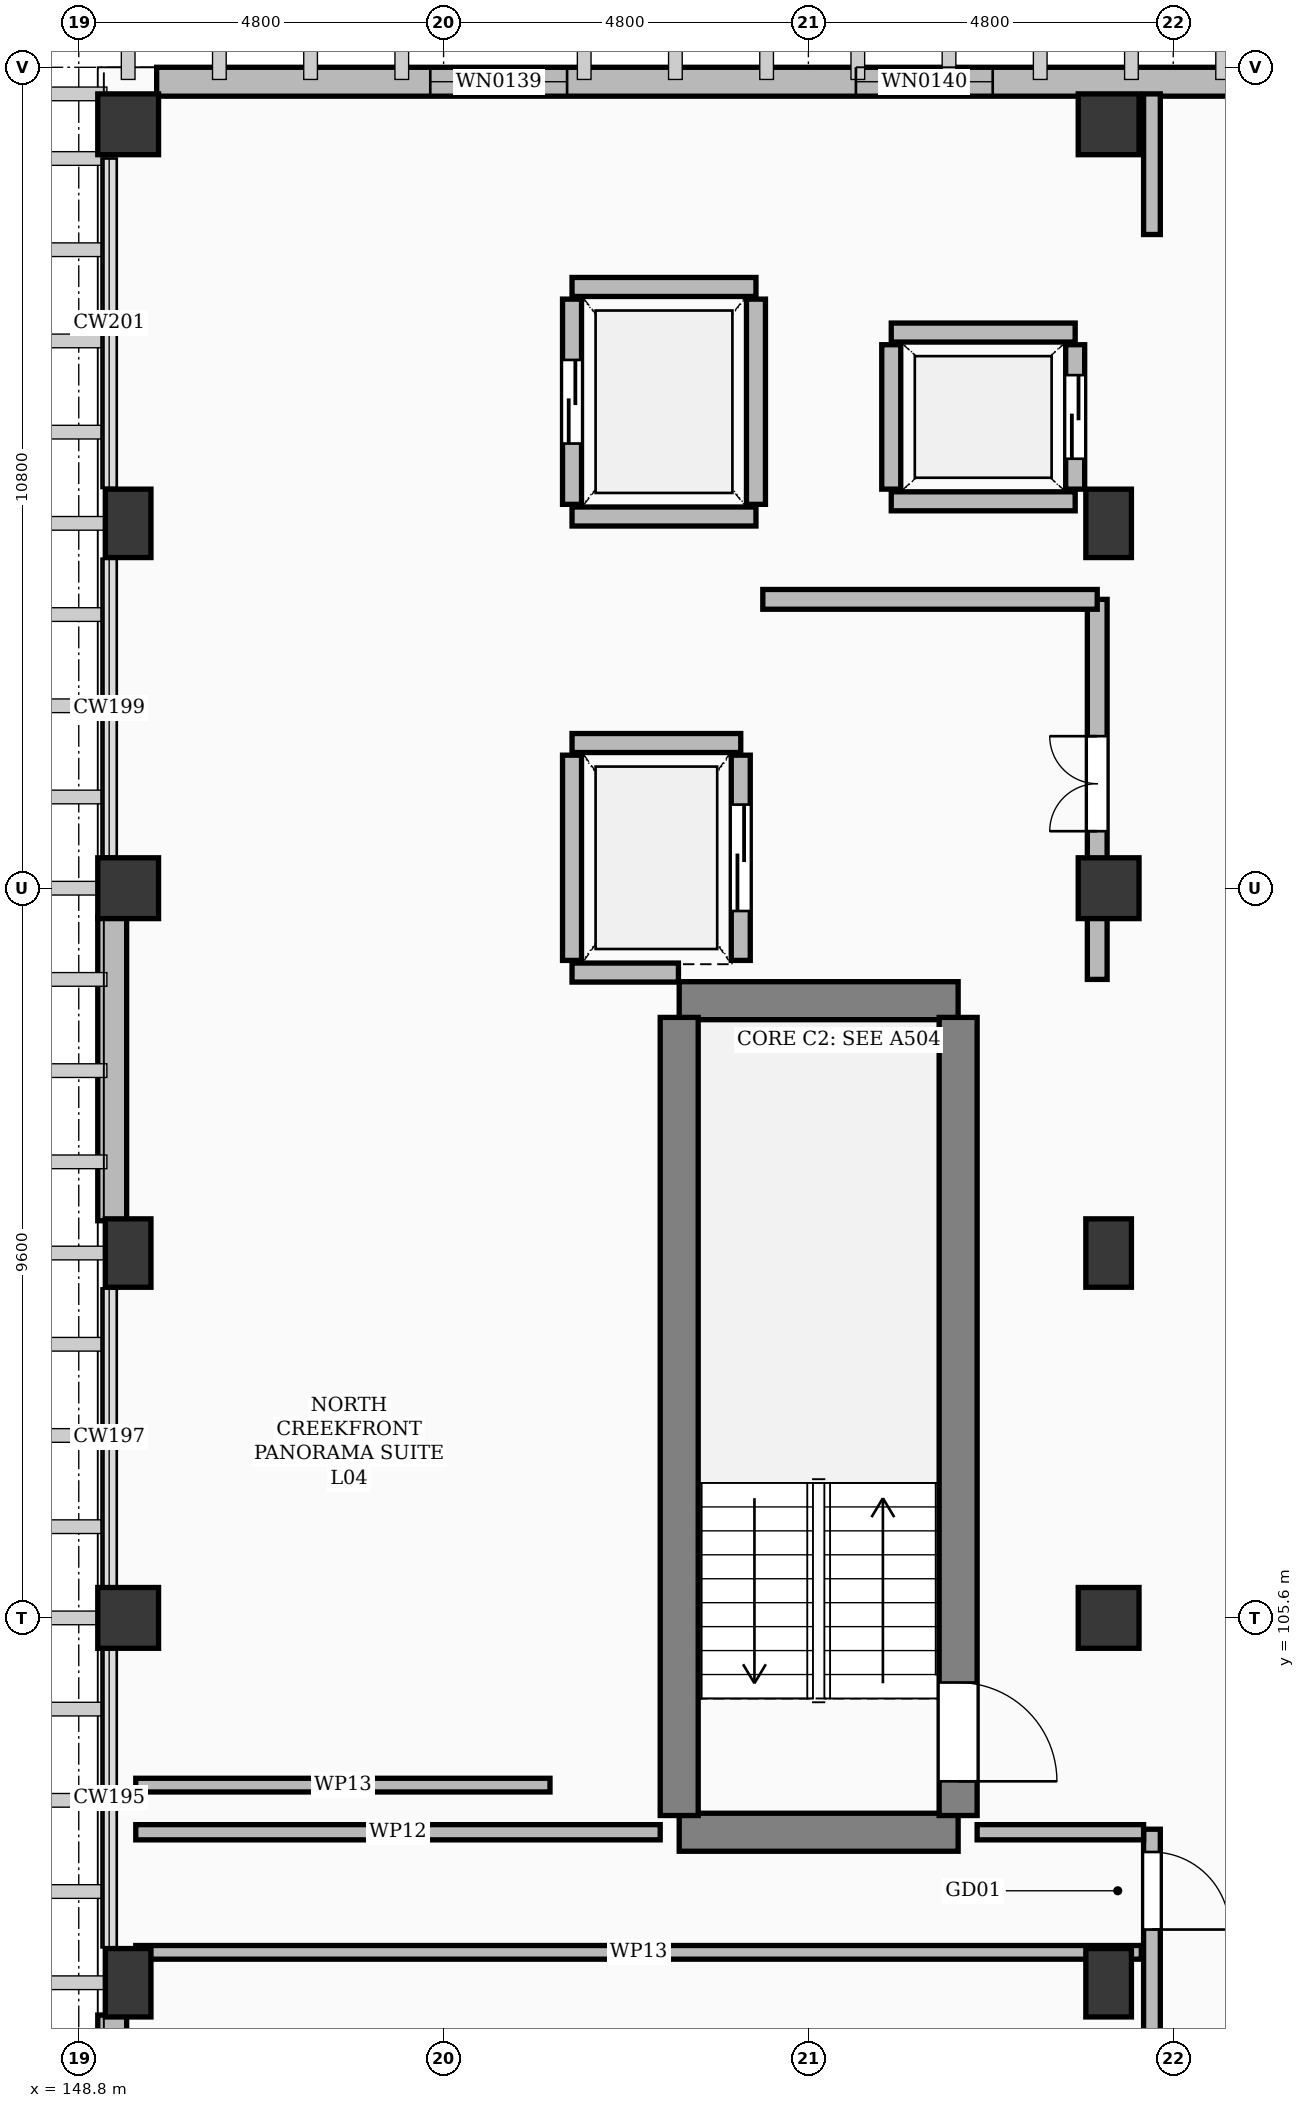
"""IFC4 building model, lengths in metres.
Left out: names, types, materials, properties, quantities, classifications, styles, units other than length and angle.
Written with IfcOpenShell. Run it as: python <this file> out.ifc"""

import sys

from ifc_helpers import new_model, si_unit, direction, frame, frame_2d, origin, origin_2d, place, context, subcontext, project, spatial, rectangle, extrude, element, fill, save


model = new_model("IFC4")
c1 = context("Model", 3, precision=1e-05, world=origin(), true_north=direction((0.0, 1.0)))
c2 = subcontext(c1, "Body", "Model", "MODEL_VIEW")
j1 = project(units=[si_unit("LENGTHUNIT", "METRE"), si_unit("PLANEANGLEUNIT", "RADIAN")], contexts=[c1])
p1 = place(None, origin())
s1 = spatial("IfcSite", under=j1, at=p1, CompositionType="ELEMENT")
p2 = place(p1, origin())
s2 = spatial("IfcBuilding", under=s1, at=p2, CompositionType="ELEMENT")
p3 = place(p2, frame((0.0, 0.0, 21.0)))
s3 = spatial("IfcBuildingStorey", under=s2, at=p3, CompositionType="ELEMENT", Elevation=21.0)
for number, where, z_axis, x_axis in (
    (1, (149.45, 105.6, 0.0), (0.0, 0.0, 1.0), (1.0, 0.0, 0.0)),
    (2, (149.45, 115.2, 0.0), (0.0, 0.0, 1.0), (1.0, 0.0, 0.0)),
    (3, (149.45, 125.25, 0.0), (0.0, 0.0, 1.0), (1.0, 0.0, 0.0)),
    (4, (162.35, 105.6, 0.0), (0.0, 0.0, 1.0), (1.0, 0.0, 0.0)),
    (5, (162.35, 115.2, 0.0), (0.0, 0.0, 1.0), (1.0, 0.0, 0.0)),
    (6, (162.35, 125.25, 0.0), (0.0, 0.0, 1.0), (1.0, 0.0, 0.0)),
):
    element("IfcColumn", number, at=place(p3, frame(where, z_axis=z_axis, x_axis=x_axis)), inside=s3, PredefinedType="COLUMN", context=c2, shape_type="SweptSolid", body=[
        extrude(rectangle(XDim=0.8, YDim=0.8, at=origin_2d()), origin(), (0.0, 0.0, 1.0), 3.6),
    ])
for number, where, z_axis, x_axis in (
    (7, (149.45, 100.8, -0.26), (0.0, 0.0, 1.0), (1.0, 0.0, 0.0)),
    (8, (149.45, 110.4, -0.26), (0.0, 0.0, 1.0), (1.0, 0.0, 0.0)),
    (9, (149.45, 120.0, -0.26), (0.0, 0.0, 1.0), (1.0, 0.0, 0.0)),
    (10, (162.35, 100.8, -0.26), (0.0, 0.0, 1.0), (1.0, 0.0, 0.0)),
    (11, (162.35, 110.4, -0.26), (0.0, 0.0, 1.0), (1.0, 0.0, 0.0)),
    (12, (162.35, 120.0, -0.26), (0.0, 0.0, 1.0), (1.0, 0.0, 0.0)),
):
    element("IfcColumn", number, at=place(p3, frame(where, z_axis=z_axis, x_axis=x_axis)), inside=s3, PredefinedType="COLUMN", context=c2, shape_type="SweptSolid", body=[
        extrude(rectangle(XDim=0.6, YDim=0.9, at=origin_2d()), origin(), (0.0, 0.0, 1.0), 3.86),
    ])
p4 = place(p3, frame((149.825, 125.81, 0.0), z_axis=(0.0, 0.0, 1.0), x_axis=(1.0, 0.0, 0.0)))
e13 = element("IfcWall", 13, at=p4, inside=s3, PredefinedType="SOLIDWALL", context=c2, shape_type="SweptSolid", body=[
    extrude(rectangle(XDim=29.15, YDim=0.38, at=frame_2d((14.575, 0.0))), origin(), (0.0, 0.0, 1.0), 3.34),
])
p5 = place(p4, frame((3.6, 0.0, 0.55)))
e14 = element("IfcOpeningElement", 14, at=p5, cuts=e13, PredefinedType="OPENING", context=c2, shape_type="SweptSolid", body=[
    extrude(rectangle(XDim=1.8, YDim=1.76, at=frame_2d((0.9, 0.88))), frame((0.0, 0.202, 0.0), z_axis=(0.0, -1.0, 0.0), x_axis=(1.0, 0.0, 0.0)), (0.0, 0.0, 1.0), 0.404),
])
p6 = place(p4, frame((9.2, 0.0, 0.55)))
e15 = element("IfcOpeningElement", 15, at=p6, cuts=e13, PredefinedType="OPENING", context=c2, shape_type="SweptSolid", body=[
    extrude(rectangle(XDim=1.8, YDim=1.76, at=frame_2d((0.9, 0.88))), frame((0.0, 0.202, 0.0), z_axis=(0.0, -1.0, 0.0), x_axis=(1.0, 0.0, 0.0)), (0.0, 0.0, 1.0), 0.404),
])
p7 = place(p4, frame((19.6, 0.0, 0.55)))
e16 = element("IfcOpeningElement", 16, at=p7, cuts=e13, PredefinedType="OPENING", context=c2, shape_type="SweptSolid", body=[
    extrude(rectangle(XDim=1.8, YDim=1.76, at=frame_2d((0.9, 0.88))), frame((0.0, 0.202, 0.0), z_axis=(0.0, -1.0, 0.0), x_axis=(1.0, 0.0, 0.0)), (0.0, 0.0, 1.0), 0.404),
])
p8 = place(p4, frame((25.2, 0.0, 0.55)))
e17 = element("IfcOpeningElement", 17, at=p8, cuts=e13, PredefinedType="OPENING", context=c2, shape_type="SweptSolid", body=[
    extrude(rectangle(XDim=1.8, YDim=1.76, at=frame_2d((0.9, 0.88))), frame((0.0, 0.202, 0.0), z_axis=(0.0, -1.0, 0.0), x_axis=(1.0, 0.0, 0.0)), (0.0, 0.0, 1.0), 0.404),
])
for number, where, z_axis, x_axis in (
    (18, (149.24, 96.375, 0.0), (0.0, 0.0, 1.0), (0.0, 1.0, 0.0)),
    (19, (149.24, 110.825, 0.0), (0.0, 0.0, 1.0), (0.0, 1.0, 0.0)),
):
    element("IfcWall", number, at=place(p3, frame(where, z_axis=z_axis, x_axis=x_axis)), inside=s3, PredefinedType="SOLIDWALL", context=c2, shape_type="SweptSolid", body=[
        extrude(rectangle(XDim=4.0, YDim=0.38, at=frame_2d((2.0, 0.0))), origin(), (0.0, 0.0, 1.0), 2.652),
    ])
for number, where, z_axis, x_axis in (
    (20, (156.7, 102.78, 0.0), (0.0, 0.0, 1.0), (1.0, 0.0, 0.0)),
    (21, (156.7, 113.72, 0.0), (0.0, 0.0, 1.0), (1.0, 0.0, 0.0)),
):
    element("IfcWall", number, at=place(p3, frame(where, z_axis=z_axis, x_axis=x_axis)), inside=s3, PredefinedType="SHEAR", context=c2, shape_type="SweptSolid", body=[
        extrude(rectangle(XDim=3.67, YDim=0.5, at=frame_2d((1.835, 0.0))), origin(), (0.0, 0.0, 1.0), 3.34),
    ])
p9 = place(p3, frame((156.7, 103.0, 0.0), z_axis=(0.0, 0.0, 1.0), x_axis=(0.0, 1.0, 0.0)))
e22 = element("IfcWall", 22, at=p9, inside=s3, PredefinedType="SHEAR", context=c2, shape_type="SweptSolid", body=[
    extrude(rectangle(XDim=10.5, YDim=0.5, at=frame_2d((5.25, 0.0))), origin(), (0.0, 0.0, 1.0), 3.34),
])
p10 = place(p3, frame((160.37, 103.0, 0.0), z_axis=(0.0, 0.0, 1.0), x_axis=(0.0, 1.0, 0.0)))
e23 = element("IfcWall", 23, at=p10, inside=s3, PredefinedType="SHEAR", context=c2, shape_type="SweptSolid", body=[
    extrude(rectangle(XDim=10.5, YDim=0.5, at=frame_2d((5.25, 0.0))), origin(), (0.0, 0.0, 1.0), 3.34),
])
p11 = place(p10, frame((0.45, 0.0, 0.0)))
e24 = element("IfcOpeningElement", 24, at=p11, cuts=e23, PredefinedType="OPENING", context=c2, shape_type="SweptSolid", body=[
    extrude(rectangle(XDim=1.3, YDim=2.15, at=frame_2d((0.65, 1.075))), frame((0.0, 0.262, 0.0), z_axis=(0.0, -1.0, 0.0), x_axis=(1.0, 0.0, 0.0)), (0.0, 0.0, 1.0), 0.524),
])
p12 = place(p3, frame((155.29, 114.09, 0.0), z_axis=(0.0, 0.0, 1.0), x_axis=(1.0, 0.0, 0.0)))
e25 = element("IfcWall", 25, at=p12, inside=s3, PredefinedType="SOLIDWALL", context=c2, shape_type="SweptSolid", body=[
    extrude(rectangle(XDim=1.4, YDim=0.25, at=frame_2d((0.7, 0.0))), origin(), (0.0, 0.0, 1.0), 3.34),
])
p13 = place(p3, frame((155.29, 117.11, 0.0), z_axis=(0.0, 0.0, 1.0), x_axis=(1.0, 0.0, 0.0)))
e26 = element("IfcWall", 26, at=p13, inside=s3, PredefinedType="SOLIDWALL", context=c2, shape_type="SweptSolid", body=[
    extrude(rectangle(XDim=2.22, YDim=0.25, at=frame_2d((1.11, 0.0))), origin(), (0.0, 0.0, 1.0), 3.34),
])
p14 = place(p3, frame((155.29, 114.25, 0.0), z_axis=(0.0, 0.0, 1.0), x_axis=(0.0, 1.0, 0.0)))
e27 = element("IfcWall", 27, at=p14, inside=s3, PredefinedType="SOLIDWALL", context=c2, shape_type="SweptSolid", body=[
    extrude(rectangle(XDim=2.7, YDim=0.25, at=frame_2d((1.35, 0.0))), origin(), (0.0, 0.0, 1.0), 2.652),
])
p15 = place(p3, frame((157.51, 114.25, 0.0), z_axis=(0.0, 0.0, 1.0), x_axis=(0.0, 1.0, 0.0)))
e28 = element("IfcWall", 28, at=p15, inside=s3, PredefinedType="SOLIDWALL", context=c2, shape_type="SweptSolid", body=[
    extrude(rectangle(XDim=2.7, YDim=0.25, at=frame_2d((1.35, 0.0))), origin(), (0.0, 0.0, 1.0), 2.652),
])
p16 = place(p15, frame((0.65, 0.0, 0.0)))
e29 = element("IfcOpeningElement", 29, at=p16, cuts=e28, PredefinedType="OPENING", context=c2, shape_type="SweptSolid", body=[
    extrude(rectangle(XDim=1.4, YDim=2.3, at=frame_2d((0.7, 1.15))), frame((0.0, 0.137, 0.0), z_axis=(0.0, -1.0, 0.0), x_axis=(1.0, 0.0, 0.0)), (0.0, 0.0, 1.0), 0.274),
])
p17 = place(p3, frame((159.49, 120.29, 0.0), z_axis=(0.0, 0.0, 1.0), x_axis=(1.0, 0.0, 0.0)))
e30 = element("IfcWall", 30, at=p17, inside=s3, PredefinedType="SOLIDWALL", context=c2, shape_type="SweptSolid", body=[
    extrude(rectangle(XDim=2.42, YDim=0.25, at=frame_2d((1.21, 0.0))), origin(), (0.0, 0.0, 1.0), 2.652),
])
p18 = place(p3, frame((159.49, 122.51, 0.0), z_axis=(0.0, 0.0, 1.0), x_axis=(1.0, 0.0, 0.0)))
e31 = element("IfcWall", 31, at=p18, inside=s3, PredefinedType="SOLIDWALL", context=c2, shape_type="SweptSolid", body=[
    extrude(rectangle(XDim=2.42, YDim=0.25, at=frame_2d((1.21, 0.0))), origin(), (0.0, 0.0, 1.0), 3.34),
])
p19 = place(p3, frame((159.49, 120.45, 0.0), z_axis=(0.0, 0.0, 1.0), x_axis=(0.0, 1.0, 0.0)))
e32 = element("IfcWall", 32, at=p19, inside=s3, PredefinedType="SOLIDWALL", context=c2, shape_type="SweptSolid", body=[
    extrude(rectangle(XDim=1.9, YDim=0.25, at=frame_2d((0.95, 0.0))), origin(), (0.0, 0.0, 1.0), 3.34),
])
p20 = place(p3, frame((161.91, 120.45, 0.0), z_axis=(0.0, 0.0, 1.0), x_axis=(0.0, 1.0, 0.0)))
e33 = element("IfcWall", 33, at=p20, inside=s3, PredefinedType="SOLIDWALL", context=c2, shape_type="SweptSolid", body=[
    extrude(rectangle(XDim=1.9, YDim=0.25, at=frame_2d((0.95, 0.0))), origin(), (0.0, 0.0, 1.0), 3.34),
])
p21 = place(p20, frame((0.4, 0.0, 0.0)))
e34 = element("IfcOpeningElement", 34, at=p21, cuts=e33, PredefinedType="OPENING", context=c2, shape_type="SweptSolid", body=[
    extrude(rectangle(XDim=1.1, YDim=2.2, at=frame_2d((0.55, 1.1))), frame((0.0, 0.137, 0.0), z_axis=(0.0, -1.0, 0.0), x_axis=(1.0, 0.0, 0.0)), (0.0, 0.0, 1.0), 0.274),
])
p22 = place(p3, frame((155.29, 120.09, 0.0), z_axis=(0.0, 0.0, 1.0), x_axis=(1.0, 0.0, 0.0)))
e35 = element("IfcWall", 35, at=p22, inside=s3, PredefinedType="SOLIDWALL", context=c2, shape_type="SweptSolid", body=[
    extrude(rectangle(XDim=2.42, YDim=0.25, at=frame_2d((1.21, 0.0))), origin(), (0.0, 0.0, 1.0), 2.652),
])
p23 = place(p3, frame((155.29, 123.11, 0.0), z_axis=(0.0, 0.0, 1.0), x_axis=(1.0, 0.0, 0.0)))
e36 = element("IfcWall", 36, at=p23, inside=s3, PredefinedType="SOLIDWALL", context=c2, shape_type="SweptSolid", body=[
    extrude(rectangle(XDim=2.42, YDim=0.25, at=frame_2d((1.21, 0.0))), origin(), (0.0, 0.0, 1.0), 3.34),
])
p24 = place(p3, frame((155.29, 120.25, 0.0), z_axis=(0.0, 0.0, 1.0), x_axis=(0.0, 1.0, 0.0)))
e37 = element("IfcWall", 37, at=p24, inside=s3, PredefinedType="SOLIDWALL", context=c2, shape_type="SweptSolid", body=[
    extrude(rectangle(XDim=2.7, YDim=0.25, at=frame_2d((1.35, 0.0))), origin(), (0.0, 0.0, 1.0), 2.652),
])
p25 = place(p24, frame((0.8, 0.0, 0.0)))
e38 = element("IfcOpeningElement", 38, at=p25, cuts=e37, PredefinedType="OPENING", context=c2, shape_type="SweptSolid", body=[
    extrude(rectangle(XDim=1.1, YDim=2.2, at=frame_2d((0.55, 1.1))), frame((0.0, 0.137, 0.0), z_axis=(0.0, -1.0, 0.0), x_axis=(1.0, 0.0, 0.0)), (0.0, 0.0, 1.0), 0.274),
])
p26 = place(p3, frame((157.71, 120.25, 0.0), z_axis=(0.0, 0.0, 1.0), x_axis=(0.0, 1.0, 0.0)))
e39 = element("IfcWall", 39, at=p26, inside=s3, PredefinedType="SOLIDWALL", context=c2, shape_type="SweptSolid", body=[
    extrude(rectangle(XDim=2.7, YDim=0.25, at=frame_2d((1.35, 0.0))), origin(), (0.0, 0.0, 1.0), 2.652),
])
p27 = place(p3, frame((162.2, 114.0, 0.0), z_axis=(0.0, 0.0, 1.0), x_axis=(0.0, 1.0, 0.0)))
e40 = element("IfcWall", 40, at=p27, inside=s3, PredefinedType="SOLIDWALL", context=c2, shape_type="SweptSolid", body=[
    extrude(rectangle(XDim=5.0, YDim=0.26, at=frame_2d((2.5, 0.0))), origin(), (0.0, 0.0, 1.0), 2.652),
])
p28 = place(p27, frame((1.95, 0.0, 0.0)))
e41 = element("IfcOpeningElement", 41, at=p28, cuts=e40, PredefinedType="OPENING", context=c2, shape_type="SweptSolid", body=[
    extrude(rectangle(XDim=1.25, YDim=2.15, at=frame_2d((0.625, 1.075))), frame((0.0, 0.142, 0.0), z_axis=(0.0, -1.0, 0.0), x_axis=(1.0, 0.0, 0.0)), (0.0, 0.0, 1.0), 0.284),
])
p29 = place(p3, frame((157.8, 119.0, 0.0), z_axis=(0.0, 0.0, 1.0), x_axis=(1.0, 0.0, 0.0)))
e42 = element("IfcWall", 42, at=p29, inside=s3, PredefinedType="SOLIDWALL", context=c2, shape_type="SweptSolid", body=[
    extrude(rectangle(XDim=4.4, YDim=0.26, at=frame_2d((2.2, 0.0))), origin(), (0.0, 0.0, 1.0), 2.652),
])
p30 = place(p3, frame((162.92, 95.6, 0.0), z_axis=(0.0, 0.0, 1.0), x_axis=(0.0, 1.0, 0.0)))
e43 = element("IfcWall", 43, at=p30, inside=s3, PredefinedType="PARTITIONING", context=c2, shape_type="SweptSolid", body=[
    extrude(rectangle(XDim=7.22, YDim=0.22, at=frame_2d((3.61, 0.0))), origin(), (0.0, 0.0, 1.0), 2.652),
])
p31 = place(p30, frame((2.05, 0.0, 0.0)))
e44 = element("IfcOpeningElement", 44, at=p31, cuts=e43, PredefinedType="OPENING", context=c2, shape_type="SweptSolid", body=[
    extrude(rectangle(XDim=0.98, YDim=2.15, at=frame_2d((0.49, 1.075))), frame((0.0, 0.122, 0.0), z_axis=(0.0, -1.0, 0.0), x_axis=(1.0, 0.0, 0.0)), (0.0, 0.0, 1.0), 0.244),
])
p32 = place(p30, frame((5.9, 0.0, 0.0)))
e45 = element("IfcOpeningElement", 45, at=p32, cuts=e43, PredefinedType="OPENING", context=c2, shape_type="SweptSolid", body=[
    extrude(rectangle(XDim=1.02, YDim=2.2, at=frame_2d((0.51, 1.1))), frame((0.0, 0.122, 0.0), z_axis=(0.0, -1.0, 0.0), x_axis=(1.0, 0.0, 0.0)), (0.0, 0.0, 1.0), 0.244),
])
p33 = place(p3, frame((162.92, 123.8, 0.0), z_axis=(0.0, 0.0, 1.0), x_axis=(0.0, 1.0, 0.0)))
e46 = element("IfcWall", 46, at=p33, inside=s3, PredefinedType="PARTITIONING", context=c2, shape_type="SweptSolid", body=[
    extrude(rectangle(XDim=1.85, YDim=0.22, at=frame_2d((0.925, 0.0))), origin(), (0.0, 0.0, 1.0), 2.582),
])
p34 = place(p3, frame((149.55, 101.2, 0.0), z_axis=(0.0, 0.0, 1.0), x_axis=(1.0, 0.0, 0.0)))
e47 = element("IfcWall", 47, at=p34, inside=s3, PredefinedType="PARTITIONING", context=c2, shape_type="SweptSolid", body=[
    extrude(rectangle(XDim=13.23, YDim=0.18, at=frame_2d((6.615, 0.0))), origin(), (0.0, 0.0, 1.0), 2.652),
])
p35 = place(p3, frame((149.55, 102.78, 0.0), z_axis=(0.0, 0.0, 1.0), x_axis=(1.0, 0.0, 0.0)))
e48 = element("IfcWall", 48, at=p35, inside=s3, PredefinedType="PARTITIONING", context=c2, shape_type="SweptSolid", body=[
    extrude(rectangle(XDim=6.9, YDim=0.2, at=frame_2d((3.45, 0.0))), origin(), (0.0, 0.0, 1.0), 2.652),
])
p36 = place(p3, frame((160.62, 102.78, 0.0), z_axis=(0.0, 0.0, 1.0), x_axis=(1.0, 0.0, 0.0)))
e49 = element("IfcWall", 49, at=p36, inside=s3, PredefinedType="PARTITIONING", context=c2, shape_type="SweptSolid", body=[
    extrude(rectangle(XDim=2.19, YDim=0.2, at=frame_2d((1.095, 0.0))), origin(), (0.0, 0.0, 1.0), 2.652),
])
p37 = place(p3, frame((149.55, 103.4, 0.0), z_axis=(0.0, 0.0, 1.0), x_axis=(1.0, 0.0, 0.0)))
e50 = element("IfcWall", 50, at=p37, inside=s3, PredefinedType="PARTITIONING", context=c2, shape_type="SweptSolid", body=[
    extrude(rectangle(XDim=5.45, YDim=0.18, at=frame_2d((2.725, 0.0))), origin(), (0.0, 0.0, 1.0), 2.652),
])
p38 = place(p5, origin())
e51 = element("IfcWindow", 51, at=p38, inside=s3, PartitioningType="SINGLE_PANEL", PredefinedType="WINDOW", context=c2, shape_type="SweptSolid", body=[
    extrude(rectangle(XDim=1.8, YDim=1.76, at=frame_2d((0.9, 0.88))), frame((0.0, 0.03, 0.0), z_axis=(0.0, -1.0, 0.0), x_axis=(1.0, 0.0, 0.0)), (0.0, 0.0, 1.0), 0.06),
])
fill(e14, e51)
p39 = place(p6, origin())
e52 = element("IfcWindow", 52, at=p39, inside=s3, PartitioningType="SINGLE_PANEL", PredefinedType="WINDOW", context=c2, shape_type="SweptSolid", body=[
    extrude(rectangle(XDim=1.8, YDim=1.76, at=frame_2d((0.9, 0.88))), frame((0.0, 0.03, 0.0), z_axis=(0.0, -1.0, 0.0), x_axis=(1.0, 0.0, 0.0)), (0.0, 0.0, 1.0), 0.06),
])
fill(e15, e52)
p40 = place(p11, frame((1.3, 0.0, 0.0), z_axis=(0.0, 0.0, 1.0), x_axis=(-1.0, 0.0, 0.0)))
e53 = element("IfcDoor", 53, at=p40, inside=s3, OperationType="SINGLE_SWING_LEFT", PredefinedType="DOOR", context=c2, shape_type="SweptSolid", body=[
    extrude(rectangle(XDim=1.3, YDim=2.15, at=frame_2d((0.65, 1.075))), frame((0.0, 0.025, 0.0), z_axis=(0.0, -1.0, 0.0), x_axis=(1.0, 0.0, 0.0)), (0.0, 0.0, 1.0), 0.05),
])
fill(e24, e53)
p41 = place(p16, origin())
e54 = element("IfcDoor", 54, at=p41, inside=s3, OperationType="SLIDING_TO_LEFT", PredefinedType="DOOR", context=c2, shape_type="SweptSolid", body=[
    extrude(rectangle(XDim=1.4, YDim=2.3, at=frame_2d((0.7, 1.15))), frame((0.0, 0.025, 0.0), z_axis=(0.0, -1.0, 0.0), x_axis=(1.0, 0.0, 0.0)), (0.0, 0.0, 1.0), 0.05),
])
fill(e29, e54)
p42 = place(p21, origin())
e55 = element("IfcDoor", 55, at=p42, inside=s3, OperationType="SLIDING_TO_LEFT", PredefinedType="DOOR", context=c2, shape_type="SweptSolid", body=[
    extrude(rectangle(XDim=1.1, YDim=2.2, at=frame_2d((0.55, 1.1))), frame((0.0, 0.025, 0.0), z_axis=(0.0, -1.0, 0.0), x_axis=(1.0, 0.0, 0.0)), (0.0, 0.0, 1.0), 0.05),
])
fill(e34, e55)
p43 = place(p25, origin())
e56 = element("IfcDoor", 56, at=p43, inside=s3, OperationType="SLIDING_TO_LEFT", PredefinedType="DOOR", context=c2, shape_type="SweptSolid", body=[
    extrude(rectangle(XDim=1.1, YDim=2.2, at=frame_2d((0.55, 1.1))), frame((0.0, 0.025, 0.0), z_axis=(0.0, -1.0, 0.0), x_axis=(1.0, 0.0, 0.0)), (0.0, 0.0, 1.0), 0.05),
])
fill(e38, e56)
p44 = place(p28, origin())
e57 = element("IfcDoor", 57, at=p44, inside=s3, OperationType="DOUBLE_DOOR_SINGLE_SWING", PredefinedType="DOOR", context=c2, shape_type="SweptSolid", body=[
    extrude(rectangle(XDim=1.25, YDim=2.15, at=frame_2d((0.625, 1.075))), frame((0.0, 0.025, 0.0), z_axis=(0.0, -1.0, 0.0), x_axis=(1.0, 0.0, 0.0)), (0.0, 0.0, 1.0), 0.05),
])
fill(e41, e57)
p45 = place(p32, frame((1.02, 0.0, 0.0), z_axis=(0.0, 0.0, 1.0), x_axis=(-1.0, 0.0, 0.0)))
e58 = element("IfcDoor", 58, at=p45, inside=s3, OperationType="SINGLE_SWING_LEFT", PredefinedType="DOOR", context=c2, shape_type="SweptSolid", body=[
    extrude(rectangle(XDim=1.02, YDim=2.2, at=frame_2d((0.51, 1.1))), frame((0.0, 0.025, 0.0), z_axis=(0.0, -1.0, 0.0), x_axis=(1.0, 0.0, 0.0)), (0.0, 0.0, 1.0), 0.05),
])
fill(e45, e58)
save(model, sys.argv[1])
